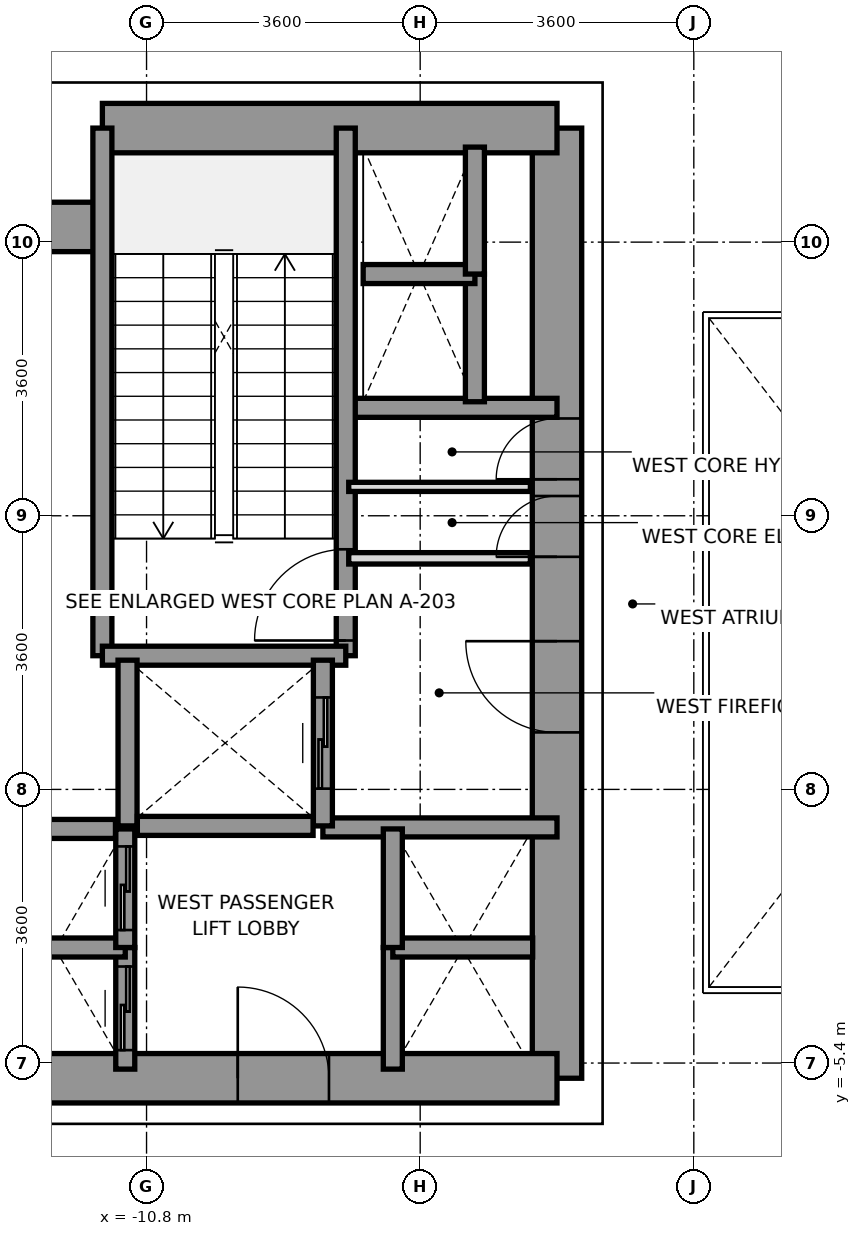
"""IFC4 building model, lengths in metres.
Left out: names, types, materials, properties, quantities, classifications, styles, units other than length and angle.
Written with IfcOpenShell. Run it as: python <this file> out.ifc"""

import sys

from ifc_helpers import new_model, si_unit, direction, frame, frame_2d, origin, place, context, subcontext, project, spatial, rectangle, extrude, source, transform, mapped, element, fill, save


model = new_model("IFC4")
c1 = context("Model", 3, precision=1e-05, world=origin(), true_north=direction((0.0, 1.0)))
c2 = subcontext(c1, "Body", "Model", "MODEL_VIEW")
j1 = project(units=[si_unit("LENGTHUNIT", "METRE"), si_unit("PLANEANGLEUNIT", "RADIAN")], contexts=[c1])
p1 = place(None, origin())
s1 = spatial("IfcSite", under=j1, at=p1, CompositionType="ELEMENT")
p2 = place(p1, origin())
s2 = spatial("IfcBuilding", under=s1, at=p2, CompositionType="ELEMENT")
p3 = place(p2, frame((0.0, 0.0, 15.6)))
s3 = spatial("IfcBuildingStorey", under=s2, at=p3, CompositionType="ELEMENT", Elevation=15.6)
p4 = place(p3, frame((-5.4, -5.6, 0.0), z_axis=(0.0, 0.0, 1.0), x_axis=(0.0, 1.0, 0.0)))
e1 = element("IfcWall", 1, at=p4, inside=s3, PredefinedType="SHEAR", context=c2, shape_type="SweptSolid", body=[
    extrude(rectangle(XDim=12.5, YDim=0.65, at=frame_2d((6.25, 0.0))), origin(), (0.0, 0.0, 1.0), 4.55),
])
p5 = place(p4, frame((4.55, 0.0, 0.0)))
e2 = element("IfcOpeningElement", 2, at=p5, cuts=e1, PredefinedType="OPENING", context=c2, shape_type="SweptSolid", body=[
    extrude(rectangle(XDim=1.2, YDim=2.2, at=frame_2d((0.6, 1.1))), frame((0.0, 0.335, 0.0), z_axis=(0.0, -1.0, 0.0), x_axis=(1.0, 0.0, 0.0)), (0.0, 0.0, 1.0), 0.67),
])
p6 = place(p4, frame((6.86, 0.0, 0.0)))
e3 = element("IfcOpeningElement", 3, at=p6, cuts=e1, PredefinedType="OPENING", context=c2, shape_type="SweptSolid", body=[
    extrude(rectangle(XDim=0.8, YDim=2.1, at=frame_2d((0.4, 1.05))), frame((0.0, 0.335, 0.0), z_axis=(0.0, -1.0, 0.0), x_axis=(1.0, 0.0, 0.0)), (0.0, 0.0, 1.0), 0.67),
])
p7 = place(p4, frame((7.88, 0.0, 0.0)))
e4 = element("IfcOpeningElement", 4, at=p7, cuts=e1, PredefinedType="OPENING", context=c2, shape_type="SweptSolid", body=[
    extrude(rectangle(XDim=0.8, YDim=2.1, at=frame_2d((0.4, 1.05))), frame((0.0, 0.335, 0.0), z_axis=(0.0, -1.0, 0.0), x_axis=(1.0, 0.0, 0.0)), (0.0, 0.0, 1.0), 0.67),
])
p8 = place(p3, frame((-11.381, 6.9, 0.0), z_axis=(0.0, 0.0, 1.0), x_axis=(1.0, 0.0, 0.0)))
e5 = element("IfcWall", 5, at=p8, inside=s3, PredefinedType="SHEAR", context=c2, shape_type="SweptSolid", body=[
    extrude(rectangle(XDim=5.981, YDim=0.65, at=frame_2d((2.991, 0.0))), origin(), (0.0, 0.0, 1.0), 4.55),
])
p9 = place(p3, frame((-13.2, 5.6, 0.0), z_axis=(0.0, 0.0, 1.0), x_axis=(1.0, 0.0, 0.0)))
e6 = element("IfcWall", 6, at=p9, inside=s3, PredefinedType="SHEAR", context=c2, shape_type="SweptSolid", body=[
    extrude(rectangle(XDim=1.819, YDim=0.65, at=frame_2d((0.909, 0.0))), origin(), (0.0, 0.0, 1.0), 4.55),
])
p10 = place(p3, frame((-13.2, -5.6, 0.0), z_axis=(0.0, 0.0, 1.0), x_axis=(1.0, 0.0, 0.0)))
e7 = element("IfcWall", 7, at=p10, inside=s3, PredefinedType="SHEAR", context=c2, shape_type="SweptSolid", body=[
    extrude(rectangle(XDim=7.8, YDim=0.65, at=frame_2d((3.9, 0.0))), origin(), (0.0, 0.0, 1.0), 4.55),
])
p11 = place(p10, frame((3.6, 0.0, 0.0)))
e8 = element("IfcOpeningElement", 8, at=p11, cuts=e7, PredefinedType="OPENING", context=c2, shape_type="SweptSolid", body=[
    extrude(rectangle(XDim=1.2, YDim=2.2, at=frame_2d((0.6, 1.1))), frame((0.0, 0.335, 0.0), z_axis=(0.0, -1.0, 0.0), x_axis=(1.0, 0.0, 0.0)), (0.0, 0.0, 1.0), 0.67),
])
p12 = place(p3, frame((-8.18, 3.22, 0.0), z_axis=(0.0, 0.0, 1.0), x_axis=(1.0, 0.0, 0.0)))
e9 = element("IfcWall", 9, at=p12, inside=s3, PredefinedType="SOLIDWALL", context=c2, shape_type="SweptSolid", body=[
    extrude(rectangle(XDim=2.78, YDim=0.25, at=frame_2d((1.39, 0.0))), origin(), (0.0, 0.0, 1.0), 4.55),
])
p13 = place(p3, frame((-8.48, -2.3, 0.0), z_axis=(0.0, 0.0, 1.0), x_axis=(1.0, 0.0, 0.0)))
e10 = element("IfcWall", 10, at=p13, inside=s3, PredefinedType="SOLIDWALL", context=c2, shape_type="SweptSolid", body=[
    extrude(rectangle(XDim=3.08, YDim=0.25, at=frame_2d((1.54, 0.0))), origin(), (0.0, 0.0, 1.0), 4.55),
])
p14 = place(p3, frame((-8.179, -0.041, 0.0), z_axis=(0.0, 0.0, 1.0), x_axis=(0.0, 1.0, 0.0)))
e11 = element("IfcWall", 11, at=p14, inside=s3, PredefinedType="SOLIDWALL", context=c2, shape_type="SweptSolid", body=[
    extrude(rectangle(XDim=6.941, YDim=0.25, at=frame_2d((3.47, 0.0))), origin(), (0.0, 0.0, 1.0), 4.55),
])
p15 = place(p14, frame((0.2, 0.0, 0.0)))
e12 = element("IfcOpeningElement", 12, at=p15, cuts=e11, PredefinedType="OPENING", context=c2, shape_type="SweptSolid", body=[
    extrude(rectangle(XDim=1.2, YDim=2.2, at=frame_2d((0.6, 1.1))), frame((0.0, 0.135, 0.0), z_axis=(0.0, -1.0, 0.0), x_axis=(1.0, 0.0, 0.0)), (0.0, 0.0, 1.0), 0.27),
])
p16 = place(p3, frame((-11.381, -0.041, 0.0), z_axis=(0.0, 0.0, 1.0), x_axis=(0.0, 1.0, 0.0)))
e13 = element("IfcWall", 13, at=p16, inside=s3, PredefinedType="SOLIDWALL", context=c2, shape_type="SweptSolid", body=[
    extrude(rectangle(XDim=6.941, YDim=0.25, at=frame_2d((3.47, 0.0))), origin(), (0.0, 0.0, 1.0), 4.55),
])
p17 = place(p3, frame((-11.381, -0.041, 0.0), z_axis=(0.0, 0.0, 1.0), x_axis=(1.0, 0.0, 0.0)))
e14 = element("IfcWall", 14, at=p17, inside=s3, PredefinedType="SOLIDWALL", context=c2, shape_type="SweptSolid", body=[
    extrude(rectangle(XDim=3.202, YDim=0.25, at=frame_2d((1.601, 0.0))), origin(), (0.0, 0.0, 1.0), 4.55),
])
p18 = place(p3, frame((-11.05, -2.28, 0.0), z_axis=(0.0, 0.0, 1.0), x_axis=(0.0, 1.0, 0.0)))
e15 = element("IfcWall", 15, at=p18, inside=s3, PredefinedType="SOLIDWALL", context=c2, shape_type="SweptSolid", body=[
    extrude(rectangle(XDim=2.18, YDim=0.25, at=frame_2d((1.09, 0.0))), origin(), (0.0, 0.0, 1.0), 4.55),
])
p19 = place(p3, frame((-8.48, -2.28, 0.0), z_axis=(0.0, 0.0, 1.0), x_axis=(0.0, 1.0, 0.0)))
e16 = element("IfcWall", 16, at=p19, inside=s3, PredefinedType="SOLIDWALL", context=c2, shape_type="SweptSolid", body=[
    extrude(rectangle(XDim=2.18, YDim=0.25, at=frame_2d((1.09, 0.0))), origin(), (0.0, 0.0, 1.0), 4.55),
])
p20 = place(p19, frame((0.49, 0.0, 0.0)))
e17 = element("IfcOpeningElement", 17, at=p20, cuts=e16, PredefinedType="OPENING", context=c2, shape_type="SweptSolid", body=[
    extrude(rectangle(XDim=1.2, YDim=2.2, at=frame_2d((0.6, 1.1))), frame((0.0, 0.135, 0.0), z_axis=(0.0, -1.0, 0.0), x_axis=(1.0, 0.0, 0.0)), (0.0, 0.0, 1.0), 0.27),
])
p21 = place(p3, frame((-10.921, -2.28, 0.0), z_axis=(0.0, 0.0, 1.0), x_axis=(1.0, 0.0, 0.0)))
e18 = element("IfcWall", 18, at=p21, inside=s3, PredefinedType="SOLIDWALL", context=c2, shape_type="SweptSolid", body=[
    extrude(rectangle(XDim=2.312, YDim=0.25, at=frame_2d((1.156, 0.0))), origin(), (0.0, 0.0, 1.0), 4.55),
])
p22 = place(p3, frame((-11.08, -5.48, 0.0), z_axis=(0.0, 0.0, 1.0), x_axis=(0.0, 1.0, 0.0)))
e19 = element("IfcWall", 19, at=p22, inside=s3, PredefinedType="SOLIDWALL", context=c2, shape_type="SweptSolid", body=[
    extrude(rectangle(XDim=1.6, YDim=0.25, at=frame_2d((0.8, 0.0))), origin(), (0.0, 0.0, 1.0), 4.55),
])
p23 = place(p22, frame((0.25, 0.0, 0.0)))
e20 = element("IfcOpeningElement", 20, at=p23, cuts=e19, PredefinedType="OPENING", context=c2, shape_type="SweptSolid", body=[
    extrude(rectangle(XDim=1.1, YDim=2.2, at=frame_2d((0.55, 1.1))), frame((0.0, 0.135, 0.0), z_axis=(0.0, -1.0, 0.0), x_axis=(1.0, 0.0, 0.0)), (0.0, 0.0, 1.0), 0.27),
])
p24 = place(p3, frame((-12.92, -3.88, 0.0), z_axis=(0.0, 0.0, 1.0), x_axis=(1.0, 0.0, 0.0)))
e21 = element("IfcWall", 21, at=p24, inside=s3, PredefinedType="SOLIDWALL", context=c2, shape_type="SweptSolid", body=[
    extrude(rectangle(XDim=1.84, YDim=0.25, at=frame_2d((0.92, 0.0))), origin(), (0.0, 0.0, 1.0), 4.55),
])
p25 = place(p3, frame((-11.08, -3.88, 0.0), z_axis=(0.0, 0.0, 1.0), x_axis=(0.0, 1.0, 0.0)))
e22 = element("IfcWall", 22, at=p25, inside=s3, PredefinedType="SOLIDWALL", context=c2, shape_type="SweptSolid", body=[
    extrude(rectangle(XDim=1.56, YDim=0.25, at=frame_2d((0.78, 0.0))), origin(), (0.0, 0.0, 1.0), 4.55),
])
p26 = place(p25, frame((0.23, 0.0, 0.0)))
e23 = element("IfcOpeningElement", 23, at=p26, cuts=e22, PredefinedType="OPENING", context=c2, shape_type="SweptSolid", body=[
    extrude(rectangle(XDim=1.1, YDim=2.2, at=frame_2d((0.55, 1.1))), frame((0.0, 0.135, 0.0), z_axis=(0.0, -1.0, 0.0), x_axis=(1.0, 0.0, 0.0)), (0.0, 0.0, 1.0), 0.27),
])
p27 = place(p3, frame((-12.791, -2.32, 0.0), z_axis=(0.0, 0.0, 1.0), x_axis=(1.0, 0.0, 0.0)))
e24 = element("IfcWall", 24, at=p27, inside=s3, PredefinedType="SOLIDWALL", context=c2, shape_type="SweptSolid", body=[
    extrude(rectangle(XDim=1.582, YDim=0.25, at=frame_2d((0.791, 0.0))), origin(), (0.0, 0.0, 1.0), 4.55),
])
p28 = place(p3, frame((-7.56, -5.48, 0.0), z_axis=(0.0, 0.0, 1.0), x_axis=(0.0, 1.0, 0.0)))
e25 = element("IfcWall", 25, at=p28, inside=s3, PredefinedType="SOLIDWALL", context=c2, shape_type="SweptSolid", body=[
    extrude(rectangle(XDim=1.6, YDim=0.25, at=frame_2d((0.8, 0.0))), origin(), (0.0, 0.0, 1.0), 4.55),
])
p29 = place(p3, frame((-7.56, -3.88, 0.0), z_axis=(0.0, 0.0, 1.0), x_axis=(1.0, 0.0, 0.0)))
e26 = element("IfcWall", 26, at=p29, inside=s3, PredefinedType="SOLIDWALL", context=c2, shape_type="SweptSolid", body=[
    extrude(rectangle(XDim=1.84, YDim=0.25, at=frame_2d((0.92, 0.0))), origin(), (0.0, 0.0, 1.0), 4.55),
])
p30 = place(p3, frame((-7.56, -3.88, 0.0), z_axis=(0.0, 0.0, 1.0), x_axis=(0.0, 1.0, 0.0)))
e27 = element("IfcWall", 27, at=p30, inside=s3, PredefinedType="SOLIDWALL", context=c2, shape_type="SweptSolid", body=[
    extrude(rectangle(XDim=1.56, YDim=0.25, at=frame_2d((0.78, 0.0))), origin(), (0.0, 0.0, 1.0), 4.55),
])
p31 = place(p3, frame((-6.48, 3.3, 0.0), z_axis=(0.0, 0.0, 1.0), x_axis=(0.0, 1.0, 0.0)))
e28 = element("IfcWall", 28, at=p31, inside=s3, PredefinedType="SOLIDWALL", context=c2, shape_type="SweptSolid", body=[
    extrude(rectangle(XDim=1.68, YDim=0.25, at=frame_2d((0.84, 0.0))), origin(), (0.0, 0.0, 1.0), 4.55),
])
p32 = place(p3, frame((-7.95, 4.98, 0.0), z_axis=(0.0, 0.0, 1.0), x_axis=(1.0, 0.0, 0.0)))
e29 = element("IfcWall", 29, at=p32, inside=s3, PredefinedType="SOLIDWALL", context=c2, shape_type="SweptSolid", body=[
    extrude(rectangle(XDim=1.47, YDim=0.25, at=frame_2d((0.735, 0.0))), origin(), (0.0, 0.0, 1.0), 4.55),
])
p33 = place(p3, frame((-6.48, 4.98, 0.0), z_axis=(0.0, 0.0, 1.0), x_axis=(0.0, 1.0, 0.0)))
e30 = element("IfcWall", 30, at=p33, inside=s3, PredefinedType="SOLIDWALL", context=c2, shape_type="SweptSolid", body=[
    extrude(rectangle(XDim=1.67, YDim=0.25, at=frame_2d((0.835, 0.0))), origin(), (0.0, 0.0, 1.0), 4.55),
])
p34 = place(p3, frame((-8.14, 1.24, 0.0), z_axis=(0.0, 0.0, 1.0), x_axis=(1.0, 0.0, 0.0)))
e31 = element("IfcWall", 31, at=p34, inside=s3, PredefinedType="PARTITIONING", context=c2, shape_type="SweptSolid", body=[
    extrude(rectangle(XDim=2.39, YDim=0.15, at=frame_2d((1.195, 0.0))), origin(), (0.0, 0.0, 1.0), 3.65),
])
p35 = place(p3, frame((-8.14, 2.18, 0.0), z_axis=(0.0, 0.0, 1.0), x_axis=(1.0, 0.0, 0.0)))
e32 = element("IfcWall", 32, at=p35, inside=s3, PredefinedType="PARTITIONING", context=c2, shape_type="SweptSolid", body=[
    extrude(rectangle(XDim=2.39, YDim=0.12, at=frame_2d((1.195, 0.0))), origin(), (0.0, 0.0, 1.0), 3.65),
])
m1 = source(origin(), c2, "Body", "SweptSolid", [
    extrude(rectangle(XDim=1.2, YDim=2.2, at=frame_2d((0.6, 1.1))), frame((0.0, 0.025, 0.0), z_axis=(0.0, -1.0, 0.0), x_axis=(1.0, 0.0, 0.0)), (0.0, 0.0, 1.0), 0.05),
])
p36 = place(p15, origin())
e33 = element("IfcDoor", 33, at=p36, inside=s3, OperationType="SINGLE_SWING_LEFT", PredefinedType="DOOR", context=c2, shape_type="MappedRepresentation", body=[
    mapped(m1, transform((0.0, 0.0, 0.0), x_axis=(1.0, 0.0, 0.0), y_axis=(0.0, 1.0, 0.0), z_axis=(0.0, 0.0, 1.0), scale=1.0)),
])
fill(e12, e33)
p37 = place(p5, origin())
e34 = element("IfcDoor", 34, at=p37, inside=s3, OperationType="SINGLE_SWING_RIGHT", PredefinedType="DOOR", context=c2, shape_type="MappedRepresentation", body=[
    mapped(m1, transform((0.0, 0.0, 0.0), x_axis=(1.0, 0.0, 0.0), y_axis=(0.0, 1.0, 0.0), z_axis=(0.0, 0.0, 1.0), scale=1.0)),
])
fill(e2, e34)
p38 = place(p11, origin())
e35 = element("IfcDoor", 35, at=p38, inside=s3, OperationType="SINGLE_SWING_LEFT", PredefinedType="DOOR", context=c2, shape_type="MappedRepresentation", body=[
    mapped(m1, transform((0.0, 0.0, 0.0), x_axis=(1.0, 0.0, 0.0), y_axis=(0.0, 1.0, 0.0), z_axis=(0.0, 0.0, 1.0), scale=1.0)),
])
fill(e8, e35)
m2 = source(origin(), c2, "Body", "SweptSolid", [
    extrude(rectangle(XDim=0.8, YDim=2.1, at=frame_2d((0.4, 1.05))), frame((0.0, 0.025, 0.0), z_axis=(0.0, -1.0, 0.0), x_axis=(1.0, 0.0, 0.0)), (0.0, 0.0, 1.0), 0.05),
])
p39 = place(p6, origin())
e36 = element("IfcDoor", 36, at=p39, inside=s3, OperationType="SINGLE_SWING_LEFT", PredefinedType="DOOR", context=c2, shape_type="MappedRepresentation", body=[
    mapped(m2, transform((0.0, 0.0, 0.0), x_axis=(1.0, 0.0, 0.0), y_axis=(0.0, 1.0, 0.0), z_axis=(0.0, 0.0, 1.0), scale=1.0)),
])
fill(e3, e36)
p40 = place(p7, origin())
e37 = element("IfcDoor", 37, at=p40, inside=s3, OperationType="SINGLE_SWING_LEFT", PredefinedType="DOOR", context=c2, shape_type="MappedRepresentation", body=[
    mapped(m2, transform((0.0, 0.0, 0.0), x_axis=(1.0, 0.0, 0.0), y_axis=(0.0, 1.0, 0.0), z_axis=(0.0, 0.0, 1.0), scale=1.0)),
])
fill(e4, e37)
p41 = place(p20, origin())
e38 = element("IfcDoor", 38, at=p41, inside=s3, OperationType="SLIDING_TO_RIGHT", PredefinedType="DOOR", context=c2, shape_type="MappedRepresentation", body=[
    mapped(m1, transform((0.0, 0.0, 0.0), x_axis=(1.0, 0.0, 0.0), y_axis=(0.0, 1.0, 0.0), z_axis=(0.0, 0.0, 1.0), scale=1.0)),
])
fill(e17, e38)
m3 = source(origin(), c2, "Body", "SweptSolid", [
    extrude(rectangle(XDim=1.1, YDim=2.2, at=frame_2d((0.55, 1.1))), frame((0.0, 0.025, 0.0), z_axis=(0.0, -1.0, 0.0), x_axis=(1.0, 0.0, 0.0)), (0.0, 0.0, 1.0), 0.05),
])
p42 = place(p23, origin())
e39 = element("IfcDoor", 39, at=p42, inside=s3, OperationType="SLIDING_TO_LEFT", PredefinedType="DOOR", context=c2, shape_type="MappedRepresentation", body=[
    mapped(m3, transform((0.0, 0.0, 0.0), x_axis=(1.0, 0.0, 0.0), y_axis=(0.0, 1.0, 0.0), z_axis=(0.0, 0.0, 1.0), scale=1.0)),
])
fill(e20, e39)
p43 = place(p26, origin())
e40 = element("IfcDoor", 40, at=p43, inside=s3, OperationType="SLIDING_TO_LEFT", PredefinedType="DOOR", context=c2, shape_type="MappedRepresentation", body=[
    mapped(m3, transform((0.0, 0.0, 0.0), x_axis=(1.0, 0.0, 0.0), y_axis=(0.0, 1.0, 0.0), z_axis=(0.0, 0.0, 1.0), scale=1.0)),
])
fill(e23, e40)
save(model, sys.argv[1])
